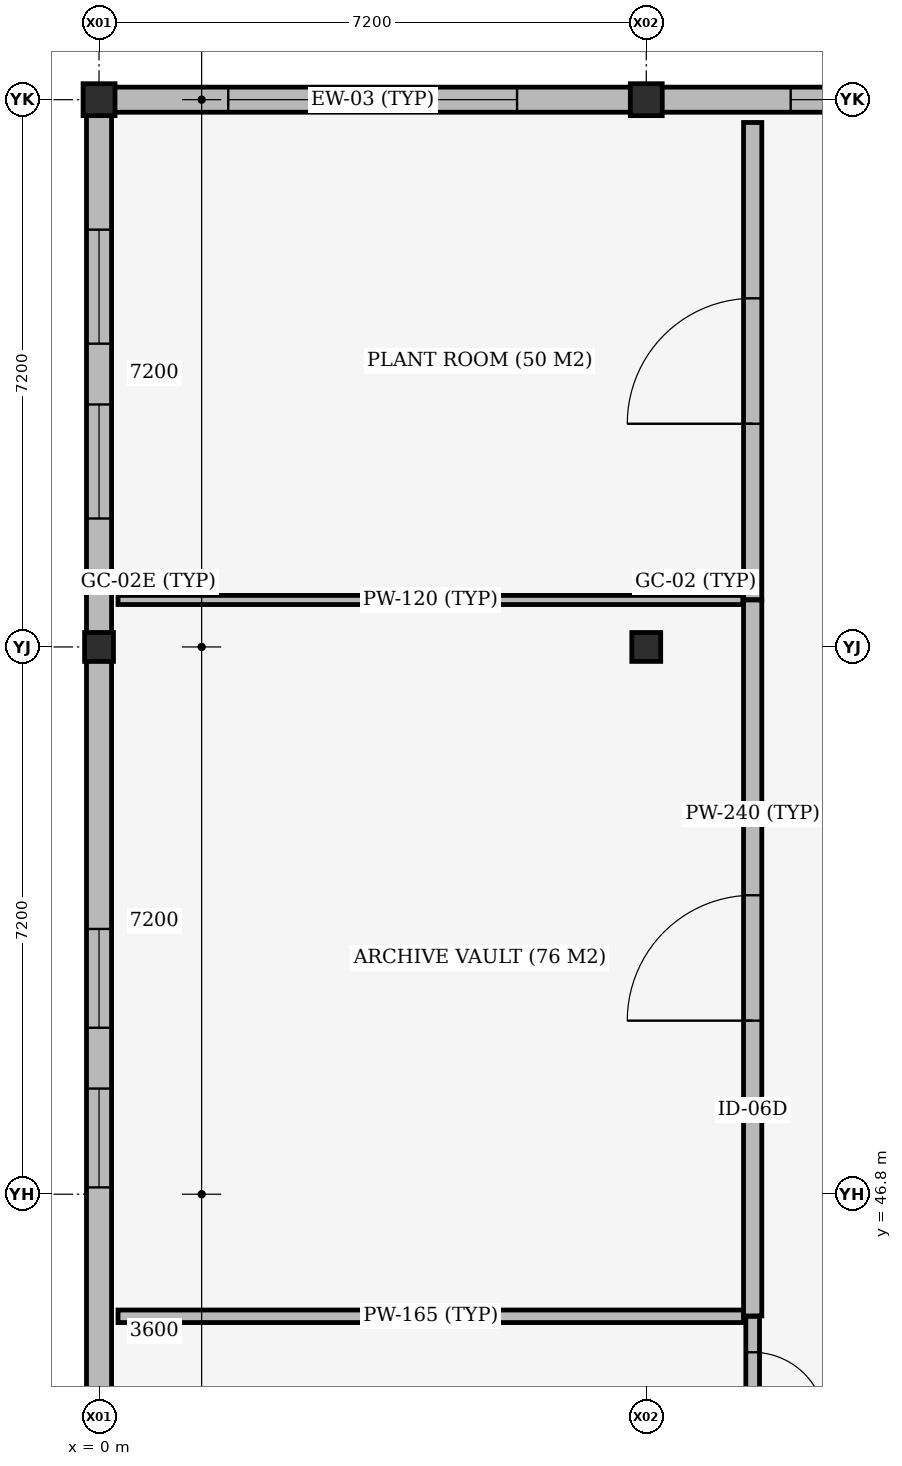
"""IFC4 building model, lengths in metres.
Left out: names, types, materials, properties, quantities, classifications, styles, units other than length and angle.
Written with IfcOpenShell. Run it as: python <this file> out.ifc"""

import sys

from ifc_helpers import new_model, si_unit, direction, frame, frame_2d, origin, origin_2d, place, context, subcontext, project, spatial, rectangle, extrude, element, fill, save


model = new_model("IFC4")
c1 = context("Model", 3, precision=1e-05, world=origin(), true_north=direction((0.0, 1.0)))
c2 = subcontext(c1, "Body", "Model", "MODEL_VIEW")
j1 = project(units=[si_unit("LENGTHUNIT", "METRE"), si_unit("PLANEANGLEUNIT", "RADIAN")], contexts=[c1])
p1 = place(None, origin())
s1 = spatial("IfcSite", under=j1, at=p1, CompositionType="ELEMENT")
p2 = place(p1, origin())
s2 = spatial("IfcBuilding", under=s1, at=p2, CompositionType="ELEMENT")
p3 = place(p2, frame((0.0, 0.0, 22.2)))
s3 = spatial("IfcBuildingStorey", under=s2, at=p3, CompositionType="ELEMENT", Elevation=22.2)
p4 = place(p3, frame((0.0, 54.0, 0.0), z_axis=(0.0, 0.0, 1.0), x_axis=(1.0, 0.0, 0.0)))
e1 = element("IfcColumn", 1, at=p4, inside=s3, PredefinedType="COLUMN", context=c2, shape_type="SweptSolid", body=[
    extrude(rectangle(XDim=0.38, YDim=0.38, at=origin_2d()), origin(), (0.0, 0.0, 1.0), 3.96),
])
p5 = place(p3, frame((0.0, 61.2, 0.0), z_axis=(0.0, 0.0, 1.0), x_axis=(1.0, 0.0, 0.0)))
e2 = element("IfcColumn", 2, at=p5, inside=s3, PredefinedType="COLUMN", context=c2, shape_type="SweptSolid", body=[
    extrude(rectangle(XDim=0.42, YDim=0.42, at=origin_2d()), origin(), (0.0, 0.0, 1.0), 3.96),
])
p6 = place(p3, frame((7.2, 54.0, 0.0), z_axis=(0.0, 0.0, 1.0), x_axis=(1.0, 0.0, 0.0)))
e3 = element("IfcColumn", 3, at=p6, inside=s3, PredefinedType="COLUMN", context=c2, shape_type="SweptSolid", body=[
    extrude(rectangle(XDim=0.38, YDim=0.38, at=origin_2d()), origin(), (0.0, 0.0, 1.0), 3.96),
])
p7 = place(p3, frame((7.2, 61.2, 0.0), z_axis=(0.0, 0.0, 1.0), x_axis=(1.0, 0.0, 0.0)))
e4 = element("IfcColumn", 4, at=p7, inside=s3, PredefinedType="COLUMN", context=c2, shape_type="SweptSolid", body=[
    extrude(rectangle(XDim=0.42, YDim=0.42, at=origin_2d()), origin(), (0.0, 0.0, 1.0), 3.96),
])
p8 = place(p3, frame((0.202, 61.2, 0.0), z_axis=(0.0, 0.0, 1.0), x_axis=(1.0, 0.0, 0.0)))
e5 = element("IfcWall", 5, at=p8, inside=s3, PredefinedType="STANDARD", context=c2, shape_type="SweptSolid", body=[
    extrude(rectangle(XDim=6.796, YDim=0.33, at=frame_2d((3.398, 0.0))), origin(), (0.0, 0.0, 1.0), 3.96),
])
p9 = place(p8, frame((1.498, 0.0, 0.95)))
e6 = element("IfcOpeningElement", 6, at=p9, cuts=e5, PredefinedType="OPENING", context=c2, shape_type="SweptSolid", body=[
    extrude(rectangle(XDim=1.5, YDim=1.8, at=frame_2d((0.75, 0.9))), frame((0.0, 0.175, 0.0), z_axis=(0.0, -1.0, 0.0), x_axis=(1.0, 0.0, 0.0)), (0.0, 0.0, 1.0), 0.35),
])
p10 = place(p8, frame((3.798, 0.0, 0.95)))
e7 = element("IfcOpeningElement", 7, at=p10, cuts=e5, PredefinedType="OPENING", context=c2, shape_type="SweptSolid", body=[
    extrude(rectangle(XDim=1.5, YDim=1.8, at=frame_2d((0.75, 0.9))), frame((0.0, 0.175, 0.0), z_axis=(0.0, -1.0, 0.0), x_axis=(1.0, 0.0, 0.0)), (0.0, 0.0, 1.0), 0.35),
])
p11 = place(p3, frame((7.402, 61.2, 0.0), z_axis=(0.0, 0.0, 1.0), x_axis=(1.0, 0.0, 0.0)))
e8 = element("IfcWall", 8, at=p11, inside=s3, PredefinedType="STANDARD", context=c2, shape_type="SweptSolid", body=[
    extrude(rectangle(XDim=6.796, YDim=0.33, at=frame_2d((3.398, 0.0))), origin(), (0.0, 0.0, 1.0), 3.96),
])
p12 = place(p11, frame((1.698, 0.0, 0.95)))
e9 = element("IfcOpeningElement", 9, at=p12, cuts=e8, PredefinedType="OPENING", context=c2, shape_type="SweptSolid", body=[
    extrude(rectangle(XDim=1.3, YDim=1.8, at=frame_2d((0.65, 0.9))), frame((0.0, 0.175, 0.0), z_axis=(0.0, -1.0, 0.0), x_axis=(1.0, 0.0, 0.0)), (0.0, 0.0, 1.0), 0.35),
])
p13 = place(p11, frame((3.798, 0.0, 0.95)))
e10 = element("IfcOpeningElement", 10, at=p13, cuts=e8, PredefinedType="OPENING", context=c2, shape_type="SweptSolid", body=[
    extrude(rectangle(XDim=1.3, YDim=1.8, at=frame_2d((0.65, 0.9))), frame((0.0, 0.175, 0.0), z_axis=(0.0, -1.0, 0.0), x_axis=(1.0, 0.0, 0.0)), (0.0, 0.0, 1.0), 0.35),
])
p14 = place(p3, frame((0.0, 43.362, 0.0), z_axis=(0.0, 0.0, 1.0), x_axis=(0.0, 1.0, 0.0)))
e11 = element("IfcWall", 11, at=p14, inside=s3, PredefinedType="STANDARD", context=c2, shape_type="SweptSolid", body=[
    extrude(rectangle(XDim=10.456, YDim=0.33, at=frame_2d((5.228, 0.0))), origin(), (0.0, 0.0, 1.0), 3.96),
])
p15 = place(p14, frame((3.528, 0.0, 0.95)))
e12 = element("IfcOpeningElement", 12, at=p15, cuts=e11, PredefinedType="OPENING", context=c2, shape_type="SweptSolid", body=[
    extrude(rectangle(XDim=1.3, YDim=1.8, at=frame_2d((0.65, 0.9))), frame((0.0, 0.175, 0.0), z_axis=(0.0, -1.0, 0.0), x_axis=(1.0, 0.0, 0.0)), (0.0, 0.0, 1.0), 0.35),
])
p16 = place(p14, frame((5.628, 0.0, 0.95)))
e13 = element("IfcOpeningElement", 13, at=p16, cuts=e11, PredefinedType="OPENING", context=c2, shape_type="SweptSolid", body=[
    extrude(rectangle(XDim=1.3, YDim=1.8, at=frame_2d((0.65, 0.9))), frame((0.0, 0.175, 0.0), z_axis=(0.0, -1.0, 0.0), x_axis=(1.0, 0.0, 0.0)), (0.0, 0.0, 1.0), 0.35),
])
p17 = place(p3, frame((0.0, 54.182, 0.0), z_axis=(0.0, 0.0, 1.0), x_axis=(0.0, 1.0, 0.0)))
e14 = element("IfcWall", 14, at=p17, inside=s3, PredefinedType="STANDARD", context=c2, shape_type="SweptSolid", body=[
    extrude(rectangle(XDim=6.816, YDim=0.33, at=frame_2d((3.408, 0.0))), origin(), (0.0, 0.0, 1.0), 3.96),
])
p18 = place(p17, frame((1.508, 0.0, 0.95)))
e15 = element("IfcOpeningElement", 15, at=p18, cuts=e14, PredefinedType="OPENING", context=c2, shape_type="SweptSolid", body=[
    extrude(rectangle(XDim=1.5, YDim=1.8, at=frame_2d((0.75, 0.9))), frame((0.0, 0.175, 0.0), z_axis=(0.0, -1.0, 0.0), x_axis=(1.0, 0.0, 0.0)), (0.0, 0.0, 1.0), 0.35),
])
p19 = place(p17, frame((3.808, 0.0, 0.95)))
e16 = element("IfcOpeningElement", 16, at=p19, cuts=e14, PredefinedType="OPENING", context=c2, shape_type="SweptSolid", body=[
    extrude(rectangle(XDim=1.5, YDim=1.8, at=frame_2d((0.75, 0.9))), frame((0.0, 0.175, 0.0), z_axis=(0.0, -1.0, 0.0), x_axis=(1.0, 0.0, 0.0)), (0.0, 0.0, 1.0), 0.35),
])
p20 = place(p3, frame((8.6, 41.605, 0.0), z_axis=(0.0, 0.0, 1.0), x_axis=(0.0, 1.0, 0.0)))
e17 = element("IfcWall", 17, at=p20, inside=s3, PredefinedType="PARTITIONING", context=c2, shape_type="SweptSolid", body=[
    extrude(rectangle(XDim=3.589, YDim=0.18, at=frame_2d((1.794, 0.0))), origin(), (0.0, 0.0, 1.0), 3.96),
])
p21 = place(p20, frame((2.156, 0.0, 0.0)))
e18 = element("IfcOpeningElement", 18, at=p21, cuts=e17, PredefinedType="OPENING", context=c2, shape_type="SweptSolid", body=[
    extrude(rectangle(XDim=0.96, YDim=2.15, at=frame_2d((0.48, 1.075))), frame((0.0, 0.1, 0.0), z_axis=(0.0, -1.0, 0.0), x_axis=(1.0, 0.0, 0.0)), (0.0, 0.0, 1.0), 0.2),
])
p22 = place(p3, frame((0.25, 45.194, 0.0), z_axis=(0.0, 0.0, 1.0), x_axis=(1.0, 0.0, 0.0)))
e19 = element("IfcWall", 19, at=p22, inside=s3, PredefinedType="PARTITIONING", context=c2, shape_type="SweptSolid", body=[
    extrude(rectangle(XDim=8.23, YDim=0.165, at=frame_2d((4.115, 0.0))), origin(), (0.0, 0.0, 1.0), 3.96),
])
p23 = place(p3, frame((8.6, 45.199, 0.0), z_axis=(0.0, 0.0, 1.0), x_axis=(0.0, 1.0, 0.0)))
e20 = element("IfcWall", 20, at=p23, inside=s3, PredefinedType="STANDARD", context=c2, shape_type="SweptSolid", body=[
    extrude(rectangle(XDim=9.419, YDim=0.24, at=frame_2d((4.709, 0.0))), origin(), (0.0, 0.0, 1.0), 3.96),
])
p24 = place(p23, frame((3.885, 0.0, 0.0)))
e21 = element("IfcOpeningElement", 21, at=p24, cuts=e20, PredefinedType="OPENING", context=c2, shape_type="SweptSolid", body=[
    extrude(rectangle(XDim=1.65, YDim=2.25, at=frame_2d((0.825, 1.125))), frame((0.0, 0.13, 0.0), z_axis=(0.0, -1.0, 0.0), x_axis=(1.0, 0.0, 0.0)), (0.0, 0.0, 1.0), 0.26),
])
p25 = place(p3, frame((0.25, 54.618, 0.0), z_axis=(0.0, 0.0, 1.0), x_axis=(1.0, 0.0, 0.0)))
e22 = element("IfcWall", 22, at=p25, inside=s3, PredefinedType="PARTITIONING", context=c2, shape_type="SweptSolid", body=[
    extrude(rectangle(XDim=8.22, YDim=0.12, at=frame_2d((4.11, 0.0))), origin(), (0.0, 0.0, 1.0), 3.96),
])
p26 = place(p3, frame((8.6, 54.623, 0.0), z_axis=(0.0, 0.0, 1.0), x_axis=(0.0, 1.0, 0.0)))
e23 = element("IfcWall", 23, at=p26, inside=s3, PredefinedType="STANDARD", context=c2, shape_type="SweptSolid", body=[
    extrude(rectangle(XDim=6.277, YDim=0.24, at=frame_2d((3.138, 0.0))), origin(), (0.0, 0.0, 1.0), 3.96),
])
p27 = place(p26, frame((2.313, 0.0, 0.0)))
e24 = element("IfcOpeningElement", 24, at=p27, cuts=e23, PredefinedType="OPENING", context=c2, shape_type="SweptSolid", body=[
    extrude(rectangle(XDim=1.65, YDim=2.25, at=frame_2d((0.825, 1.125))), frame((0.0, 0.13, 0.0), z_axis=(0.0, -1.0, 0.0), x_axis=(1.0, 0.0, 0.0)), (0.0, 0.0, 1.0), 0.26),
])
p28 = place(p9, origin())
e25 = element("IfcWindow", 25, at=p28, inside=s3, PartitioningType="DOUBLE_PANEL_VERTICAL", PredefinedType="WINDOW", context=c2, shape_type="SweptSolid", body=[
    extrude(rectangle(XDim=1.5, YDim=1.8, at=frame_2d((0.75, 0.9))), frame((0.0, 0.03, 0.0), z_axis=(0.0, -1.0, 0.0), x_axis=(1.0, 0.0, 0.0)), (0.0, 0.0, 1.0), 0.06),
])
fill(e6, e25)
p29 = place(p10, origin())
e26 = element("IfcWindow", 26, at=p29, inside=s3, PartitioningType="DOUBLE_PANEL_VERTICAL", PredefinedType="WINDOW", context=c2, shape_type="SweptSolid", body=[
    extrude(rectangle(XDim=1.5, YDim=1.8, at=frame_2d((0.75, 0.9))), frame((0.0, 0.03, 0.0), z_axis=(0.0, -1.0, 0.0), x_axis=(1.0, 0.0, 0.0)), (0.0, 0.0, 1.0), 0.06),
])
fill(e7, e26)
p30 = place(p12, origin())
e27 = element("IfcWindow", 27, at=p30, inside=s3, PartitioningType="DOUBLE_PANEL_VERTICAL", PredefinedType="WINDOW", context=c2, shape_type="SweptSolid", body=[
    extrude(rectangle(XDim=1.3, YDim=1.8, at=frame_2d((0.65, 0.9))), frame((0.0, 0.03, 0.0), z_axis=(0.0, -1.0, 0.0), x_axis=(1.0, 0.0, 0.0)), (0.0, 0.0, 1.0), 0.06),
])
fill(e9, e27)
p31 = place(p15, origin())
e28 = element("IfcWindow", 28, at=p31, inside=s3, PartitioningType="DOUBLE_PANEL_VERTICAL", PredefinedType="WINDOW", context=c2, shape_type="SweptSolid", body=[
    extrude(rectangle(XDim=1.3, YDim=1.8, at=frame_2d((0.65, 0.9))), frame((0.0, 0.03, 0.0), z_axis=(0.0, -1.0, 0.0), x_axis=(1.0, 0.0, 0.0)), (0.0, 0.0, 1.0), 0.06),
])
fill(e12, e28)
p32 = place(p16, origin())
e29 = element("IfcWindow", 29, at=p32, inside=s3, PartitioningType="DOUBLE_PANEL_VERTICAL", PredefinedType="WINDOW", context=c2, shape_type="SweptSolid", body=[
    extrude(rectangle(XDim=1.3, YDim=1.8, at=frame_2d((0.65, 0.9))), frame((0.0, 0.03, 0.0), z_axis=(0.0, -1.0, 0.0), x_axis=(1.0, 0.0, 0.0)), (0.0, 0.0, 1.0), 0.06),
])
fill(e13, e29)
p33 = place(p18, origin())
e30 = element("IfcWindow", 30, at=p33, inside=s3, PartitioningType="DOUBLE_PANEL_VERTICAL", PredefinedType="WINDOW", context=c2, shape_type="SweptSolid", body=[
    extrude(rectangle(XDim=1.5, YDim=1.8, at=frame_2d((0.75, 0.9))), frame((0.0, 0.03, 0.0), z_axis=(0.0, -1.0, 0.0), x_axis=(1.0, 0.0, 0.0)), (0.0, 0.0, 1.0), 0.06),
])
fill(e15, e30)
p34 = place(p19, origin())
e31 = element("IfcWindow", 31, at=p34, inside=s3, PartitioningType="DOUBLE_PANEL_VERTICAL", PredefinedType="WINDOW", context=c2, shape_type="SweptSolid", body=[
    extrude(rectangle(XDim=1.5, YDim=1.8, at=frame_2d((0.75, 0.9))), frame((0.0, 0.03, 0.0), z_axis=(0.0, -1.0, 0.0), x_axis=(1.0, 0.0, 0.0)), (0.0, 0.0, 1.0), 0.06),
])
fill(e16, e31)
p35 = place(p21, origin())
e32 = element("IfcDoor", 32, at=p35, inside=s3, OperationType="SINGLE_SWING_RIGHT", PredefinedType="DOOR", context=c2, shape_type="SweptSolid", body=[
    extrude(rectangle(XDim=0.96, YDim=2.15, at=frame_2d((0.48, 1.075))), frame((0.0, 0.025, 0.0), z_axis=(0.0, -1.0, 0.0), x_axis=(1.0, 0.0, 0.0)), (0.0, 0.0, 1.0), 0.05),
])
fill(e18, e32)
p36 = place(p24, origin())
e33 = element("IfcDoor", 33, at=p36, inside=s3, OperationType="DOUBLE_DOOR_SINGLE_SWING", PredefinedType="DOOR", context=c2, shape_type="SweptSolid", body=[
    extrude(rectangle(XDim=1.65, YDim=2.25, at=frame_2d((0.825, 1.125))), frame((0.0, 0.025, 0.0), z_axis=(0.0, -1.0, 0.0), x_axis=(1.0, 0.0, 0.0)), (0.0, 0.0, 1.0), 0.05),
])
fill(e21, e33)
p37 = place(p27, origin())
e34 = element("IfcDoor", 34, at=p37, inside=s3, OperationType="DOUBLE_DOOR_SINGLE_SWING", PredefinedType="DOOR", context=c2, shape_type="SweptSolid", body=[
    extrude(rectangle(XDim=1.65, YDim=2.25, at=frame_2d((0.825, 1.125))), frame((0.0, 0.025, 0.0), z_axis=(0.0, -1.0, 0.0), x_axis=(1.0, 0.0, 0.0)), (0.0, 0.0, 1.0), 0.05),
])
fill(e24, e34)
save(model, sys.argv[1])
